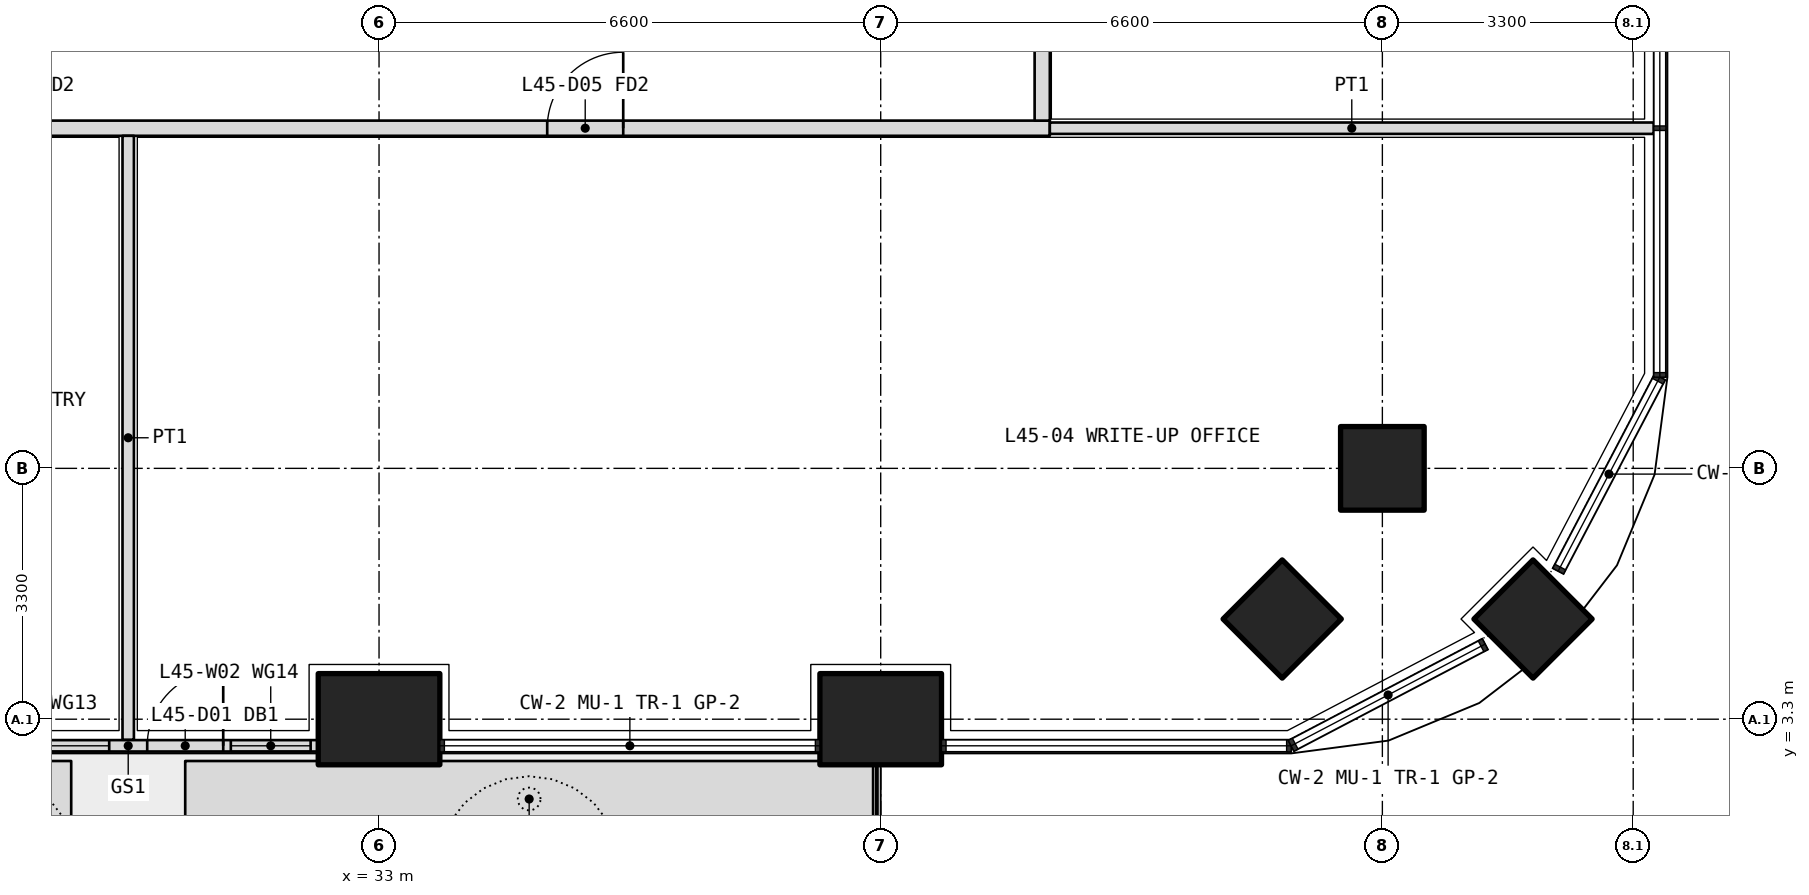
"""IFC4 building model, lengths in metres.
Left out: names, types, materials, properties, quantities, classifications, styles, units other than length and angle.
Written with IfcOpenShell. Run it as: python <this file> out.ifc"""

import sys

from ifc_helpers import new_model, si_unit, direction, frame, frame_2d, origin, origin_2d, place, context, subcontext, project, spatial, polyline, rectangle, outline, extrude, element, fill, save


model = new_model("IFC4")
c1 = context("Model", 3, precision=1e-05, world=origin(), true_north=direction((0.0, 1.0)))
c2 = subcontext(c1, "Body", "Model", "MODEL_VIEW")
j1 = project(units=[si_unit("LENGTHUNIT", "METRE"), si_unit("PLANEANGLEUNIT", "RADIAN")], contexts=[c1])
p1 = place(None, origin())
s1 = spatial("IfcSite", under=j1, at=p1, CompositionType="ELEMENT")
p2 = place(p1, origin())
s2 = spatial("IfcBuilding", under=s1, at=p2, CompositionType="ELEMENT")
p3 = place(p2, frame((0.0, 0.0, 197.7)))
s3 = spatial("IfcBuildingStorey", under=s2, at=p3, CompositionType="ELEMENT", Elevation=197.7)
p4 = place(p3, frame((48.182, 4.618, 0.0), z_axis=(0.0, 0.0, 1.0), x_axis=(0.707106781187, 0.707106781187, 0.0)))
e1 = element("IfcColumn", 1, at=p4, inside=s3, PredefinedType="COLUMN", context=c2, shape_type="SweptSolid", body=[
    extrude(rectangle(XDim=1.1, YDim=1.1, at=origin_2d()), origin(), (0.0, 0.0, 1.0), 4.2),
])
for number, where, z_axis, x_axis in (
    (2, (33.0, 3.3, 0.0), (0.0, 0.0, 1.0), (1.0, 0.0, 0.0)),
    (3, (39.6, 3.3, 0.0), (0.0, 0.0, 1.0), (1.0, 0.0, 0.0)),
):
    element("IfcColumn", number, at=place(p3, frame(where, z_axis=z_axis, x_axis=x_axis)), inside=s3, PredefinedType="COLUMN", context=c2, shape_type="SweptSolid", body=[
        extrude(rectangle(XDim=1.6, YDim=1.2, at=origin_2d()), origin(), (0.0, 0.0, 1.0), 4.2),
    ])
for number, where, z_axis, x_axis in (
    (4, (46.2, 6.6, 0.0), (0.0, 0.0, 1.0), (1.0, 0.0, 0.0)),
    (5, (44.882, 4.618, 0.0), (0.0, 0.0, 1.0), (0.707, 0.707, 0.0)),
):
    element("IfcColumn", number, at=place(p3, frame(where, z_axis=z_axis, x_axis=x_axis)), inside=s3, PredefinedType="COLUMN", context=c2, shape_type="SweptSolid", body=[
        extrude(rectangle(XDim=1.1, YDim=1.1, at=origin_2d()), origin(), (0.0, 0.0, 1.0), 4.2),
    ])
p5 = place(p3, origin())
e6 = element("IfcWall", 6, at=p5, inside=s3, PredefinedType="USERDEFINED", context=c2, shape_type="SweptSolid", body=[
    extrude(outline(polyline([(26.5, 1.75), (28.95, 1.75), (28.95, 2.75), (26.5, 2.75), (26.5, 1.75)]), holes=[polyline([(26.65, 1.9), (28.8, 1.9), (28.8, 2.6), (26.65, 2.6), (26.65, 1.9)])]), origin(), (0.0, 0.0, 1.0), 1.05),
])
p6 = place(p3, origin())
e7 = element("IfcWall", 7, at=p6, inside=s3, PredefinedType="USERDEFINED", context=c2, shape_type="SweptSolid", body=[
    extrude(outline(polyline([(30.45, 1.75), (39.5, 1.75), (39.5, 2.75), (30.45, 2.75), (30.45, 1.75)]), holes=[polyline([(30.6, 1.9), (39.35, 1.9), (39.35, 2.6), (30.6, 2.6), (30.6, 1.9)])]), origin(), (0.0, 0.0, 1.0), 1.05),
])
p7 = place(p3, frame((27.2, 2.95, 0.0), z_axis=(0.0, 0.0, 1.0), x_axis=(1.0, 0.0, 0.0)))
e8 = element("IfcWall", 8, at=p7, inside=s3, PredefinedType="SOLIDWALL", context=c2, shape_type="SweptSolid", body=[
    extrude(rectangle(XDim=5.0, YDim=0.15, at=frame_2d((2.5, 0.0))), origin(), (0.0, 0.0, 1.0), 2.7),
])
p8 = place(p7, frame((2.75, 0.0, 0.0)))
e9 = element("IfcOpeningElement", 9, at=p8, cuts=e8, PredefinedType="OPENING", context=c2, shape_type="SweptSolid", body=[
    extrude(rectangle(XDim=1.0, YDim=2.4, at=frame_2d((0.5, 1.2))), frame((0.0, 0.085, 0.0), z_axis=(0.0, -1.0, 0.0), x_axis=(1.0, 0.0, 0.0)), (0.0, 0.0, 1.0), 0.17),
])
p9 = place(p7, frame((0.1, 0.0, 0.1)))
e10 = element("IfcOpeningElement", 10, at=p9, cuts=e8, PredefinedType="OPENING", context=c2, shape_type="SweptSolid", body=[
    extrude(rectangle(XDim=2.15, YDim=2.3, at=frame_2d((1.075, 1.15))), frame((0.0, 0.085, 0.0), z_axis=(0.0, -1.0, 0.0), x_axis=(1.0, 0.0, 0.0)), (0.0, 0.0, 1.0), 0.17),
])
p10 = place(p7, frame((3.85, 0.0, 0.1)))
e11 = element("IfcOpeningElement", 11, at=p10, cuts=e8, PredefinedType="OPENING", context=c2, shape_type="SweptSolid", body=[
    extrude(rectangle(XDim=1.05, YDim=2.3, at=frame_2d((0.525, 1.15))), frame((0.0, 0.085, 0.0), z_axis=(0.0, -1.0, 0.0), x_axis=(1.0, 0.0, 0.0)), (0.0, 0.0, 1.0), 0.17),
])
p11 = place(p3, frame((10.975, 11.075, 0.0), z_axis=(0.0, 0.0, 1.0), x_axis=(1.0, 0.0, 0.0)))
e12 = element("IfcWall", 12, at=p11, inside=s3, PredefinedType="PARTITIONING", context=c2, shape_type="SweptSolid", body=[
    extrude(rectangle(XDim=30.85, YDim=0.2, at=frame_2d((15.425, 0.0))), origin(), (0.0, 0.0, 1.0), 2.85),
])
p12 = place(p11, frame((5.512, 0.0, 0.0)))
e13 = element("IfcOpeningElement", 13, at=p12, cuts=e12, PredefinedType="OPENING", context=c2, shape_type="SweptSolid", body=[
    extrude(rectangle(XDim=1.2, YDim=2.1, at=frame_2d((0.6, 1.05))), frame((0.0, 0.11, 0.0), z_axis=(0.0, -1.0, 0.0), x_axis=(1.0, 0.0, 0.0)), (0.0, 0.0, 1.0), 0.22),
])
p13 = place(p11, frame((13.375, 0.0, 0.0)))
e14 = element("IfcOpeningElement", 14, at=p13, cuts=e12, PredefinedType="OPENING", context=c2, shape_type="SweptSolid", body=[
    extrude(rectangle(XDim=1.0, YDim=2.1, at=frame_2d((0.5, 1.05))), frame((0.0, 0.11, 0.0), z_axis=(0.0, -1.0, 0.0), x_axis=(1.0, 0.0, 0.0)), (0.0, 0.0, 1.0), 0.22),
])
p14 = place(p11, frame((16.675, 0.0, 0.0)))
e15 = element("IfcOpeningElement", 15, at=p14, cuts=e12, PredefinedType="OPENING", context=c2, shape_type="SweptSolid", body=[
    extrude(rectangle(XDim=1.0, YDim=2.1, at=frame_2d((0.5, 1.05))), frame((0.0, 0.11, 0.0), z_axis=(0.0, -1.0, 0.0), x_axis=(1.0, 0.0, 0.0)), (0.0, 0.0, 1.0), 0.22),
])
p15 = place(p11, frame((24.238, 0.0, 0.0)))
e16 = element("IfcOpeningElement", 16, at=p15, cuts=e12, PredefinedType="OPENING", context=c2, shape_type="SweptSolid", body=[
    extrude(rectangle(XDim=1.0, YDim=2.1, at=frame_2d((0.5, 1.05))), frame((0.0, 0.11, 0.0), z_axis=(0.0, -1.0, 0.0), x_axis=(1.0, 0.0, 0.0)), (0.0, 0.0, 1.0), 0.22),
])
p16 = place(p3, frame((41.725, 11.175, 0.0), z_axis=(0.0, 0.0, 1.0), x_axis=(0.0, 1.0, 0.0)))
e17 = element("IfcWall", 17, at=p16, inside=s3, PredefinedType="PARTITIONING", context=c2, shape_type="SweptSolid", body=[
    extrude(rectangle(XDim=18.525, YDim=0.2, at=frame_2d((9.262, 0.0))), origin(), (0.0, 0.0, 1.0), 2.85),
])
p17 = place(p16, frame((2.113, 0.0, 0.0)))
e18 = element("IfcOpeningElement", 18, at=p17, cuts=e17, PredefinedType="OPENING", context=c2, shape_type="SweptSolid", body=[
    extrude(rectangle(XDim=1.0, YDim=2.1, at=frame_2d((0.5, 1.05))), frame((0.0, 0.11, 0.0), z_axis=(0.0, -1.0, 0.0), x_axis=(1.0, 0.0, 0.0)), (0.0, 0.0, 1.0), 0.22),
])
p18 = place(p16, frame((6.375, 0.0, 0.0)))
e19 = element("IfcOpeningElement", 19, at=p18, cuts=e17, PredefinedType="OPENING", context=c2, shape_type="SweptSolid", body=[
    extrude(rectangle(XDim=1.2, YDim=2.1, at=frame_2d((0.6, 1.05))), frame((0.0, 0.11, 0.0), z_axis=(0.0, -1.0, 0.0), x_axis=(1.0, 0.0, 0.0)), (0.0, 0.0, 1.0), 0.22),
])
p19 = place(p16, frame((9.625, 0.0, 0.0)))
e20 = element("IfcOpeningElement", 20, at=p19, cuts=e17, PredefinedType="OPENING", context=c2, shape_type="SweptSolid", body=[
    extrude(rectangle(XDim=1.0, YDim=2.1, at=frame_2d((0.5, 1.05))), frame((0.0, 0.11, 0.0), z_axis=(0.0, -1.0, 0.0), x_axis=(1.0, 0.0, 0.0)), (0.0, 0.0, 1.0), 0.22),
])
p20 = place(p16, frame((12.975, 0.0, 0.0)))
e21 = element("IfcOpeningElement", 21, at=p20, cuts=e17, PredefinedType="OPENING", context=c2, shape_type="SweptSolid", body=[
    extrude(rectangle(XDim=0.9, YDim=2.1, at=frame_2d((0.45, 1.05))), frame((0.0, 0.11, 0.0), z_axis=(0.0, -1.0, 0.0), x_axis=(1.0, 0.0, 0.0)), (0.0, 0.0, 1.0), 0.22),
])
p21 = place(p16, frame((16.375, 0.0, 0.0)))
e22 = element("IfcOpeningElement", 22, at=p21, cuts=e17, PredefinedType="OPENING", context=c2, shape_type="SweptSolid", body=[
    extrude(rectangle(XDim=1.0, YDim=2.1, at=frame_2d((0.5, 1.05))), frame((0.0, 0.11, 0.0), z_axis=(0.0, -1.0, 0.0), x_axis=(1.0, 0.0, 0.0)), (0.0, 0.0, 1.0), 0.22),
])
for number, where, z_axis, x_axis in (
    (23, (49.77, 11.075, 0.0), (0.0, 0.0, 1.0), (-1.0, 0.0, 0.0)),
    (24, (29.7, 3.03, 0.0), (0.0, 0.0, 1.0), (0.0, 1.0, 0.0)),
):
    element("IfcWall", number, at=place(p3, frame(where, z_axis=z_axis, x_axis=x_axis)), inside=s3, PredefinedType="PARTITIONING", context=c2, shape_type="SweptSolid", body=[
        extrude(rectangle(XDim=7.945, YDim=0.15, at=frame_2d((3.973, 0.0))), origin(), (0.0, 0.0, 1.0), 2.7),
    ])
p22 = place(p8, origin())
e25 = element("IfcDoor", 25, at=p22, inside=s3, OperationType="SINGLE_SWING_RIGHT", PredefinedType="DOOR", context=c2, shape_type="SweptSolid", body=[
    extrude(rectangle(XDim=1.0, YDim=2.4, at=frame_2d((0.5, 1.2))), frame((0.0, 0.025, 0.0), z_axis=(0.0, -1.0, 0.0), x_axis=(1.0, 0.0, 0.0)), (0.0, 0.0, 1.0), 0.05),
])
fill(e9, e25)
p23 = place(p9, origin())
e26 = element("IfcWindow", 26, at=p23, inside=s3, PartitioningType="SINGLE_PANEL", PredefinedType="WINDOW", context=c2, shape_type="SweptSolid", body=[
    extrude(rectangle(XDim=2.15, YDim=2.3, at=frame_2d((1.075, 1.15))), frame((0.0, 0.03, 0.0), z_axis=(0.0, -1.0, 0.0), x_axis=(1.0, 0.0, 0.0)), (0.0, 0.0, 1.0), 0.06),
])
fill(e10, e26)
p24 = place(p10, origin())
e27 = element("IfcWindow", 27, at=p24, inside=s3, PartitioningType="SINGLE_PANEL", PredefinedType="WINDOW", context=c2, shape_type="SweptSolid", body=[
    extrude(rectangle(XDim=1.05, YDim=2.3, at=frame_2d((0.525, 1.15))), frame((0.0, 0.03, 0.0), z_axis=(0.0, -1.0, 0.0), x_axis=(1.0, 0.0, 0.0)), (0.0, 0.0, 1.0), 0.06),
])
fill(e11, e27)
p25 = place(p15, origin())
e28 = element("IfcDoor", 28, at=p25, inside=s3, OperationType="SINGLE_SWING_RIGHT", PredefinedType="DOOR", context=c2, shape_type="SweptSolid", body=[
    extrude(rectangle(XDim=1.0, YDim=2.1, at=frame_2d((0.5, 1.05))), frame((0.0, 0.025, 0.0), z_axis=(0.0, -1.0, 0.0), x_axis=(1.0, 0.0, 0.0)), (0.0, 0.0, 1.0), 0.05),
])
fill(e16, e28)
save(model, sys.argv[1])
